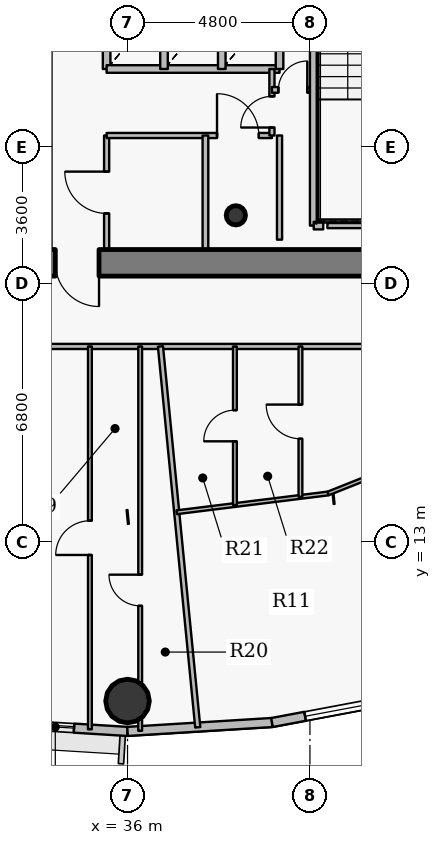
"""IFC4 building model, lengths in metres.
Left out: names, types, materials, properties, quantities, classifications, styles, units other than length and angle.
Written with IfcOpenShell. Run it as: python <this file> out.ifc"""

import sys

from ifc_helpers import new_model, si_unit, direction, frame, frame_2d, origin, origin_2d, place, context, subcontext, project, spatial, rectangle, hollow_circle, extrude, source, transform, mapped, element, fill, save


model = new_model("IFC4")
c1 = context("Model", 3, precision=1e-05, world=origin(), true_north=direction((0.0, 1.0)))
c2 = subcontext(c1, "Body", "Model", "MODEL_VIEW")
j1 = project(units=[si_unit("LENGTHUNIT", "METRE"), si_unit("PLANEANGLEUNIT", "RADIAN")], contexts=[c1])
p1 = place(None, origin())
s1 = spatial("IfcSite", under=j1, at=p1, CompositionType="ELEMENT")
p2 = place(p1, origin())
s2 = spatial("IfcBuilding", under=s1, at=p2, CompositionType="ELEMENT")
p3 = place(p2, frame((0.0, 0.0, 251.55)))
s3 = spatial("IfcBuildingStorey", under=s2, at=p3, CompositionType="ELEMENT", Elevation=251.55)
p4 = place(p3, frame((38.85, 21.6, 0.0), z_axis=(0.0, 0.0, 1.0), x_axis=(1.0, 0.0, 0.0)))
e1 = element("IfcColumn", 1, at=p4, inside=s3, PredefinedType="COLUMN", context=c2, shape_type="SweptSolid", body=[
    extrude(hollow_circle(Radius=0.254, WallThickness=0.02, at=origin_2d()), origin(), (0.0, 0.0, 1.0), 3.75),
])
p5 = place(p3, frame((44.95, 20.35, 0.0), z_axis=(0.0, 0.0, 1.0), x_axis=(-1.0, 0.0, 0.0)))
e2 = element("IfcWall", 2, at=p5, inside=s3, PredefinedType="SHEAR", context=c2, shape_type="SweptSolid", body=[
    extrude(rectangle(XDim=17.9, YDim=0.7, at=frame_2d((8.95, 0.0))), origin(), (0.0, 0.0, 1.0), 3.05),
])
p6 = place(p5, frame((9.7, 0.0, 0.0)))
e3 = element("IfcOpeningElement", 3, at=p6, cuts=e2, PredefinedType="OPENING", context=c2, shape_type="SweptSolid", body=[
    extrude(rectangle(XDim=1.15, YDim=2.15, at=origin_2d()), frame((0.575, 0.36, 1.075), z_axis=(0.0, -1.0, 0.0), x_axis=(1.0, 0.0, 0.0)), (0.0, 0.0, 1.0), 0.72),
])
p7 = place(p3, frame((36.0, 8.82, 0.0), z_axis=(0.0, 0.0, 1.0), x_axis=(1.0, 0.0, 0.0)))
e4 = element("IfcColumn", 4, at=p7, inside=s3, PredefinedType="COLUMN", context=c2, shape_type="SweptSolid", body=[
    extrude(hollow_circle(Radius=0.575, WallThickness=0.036, at=origin_2d()), origin(), (0.0, 0.0, 1.0), 3.75),
])
p8 = place(p3, frame((36.0, 8.02, 0.0), z_axis=(0.0, 0.0, 1.0), x_axis=(-0.998108785312, 0.06147237333, 0.0)))
e5 = element("IfcWall", 5, at=p8, inside=s3, PredefinedType="SOLIDWALL", context=c2, shape_type="SweptSolid", body=[
    extrude(rectangle(XDim=3.809, YDim=0.24, at=frame_2d((1.904, 0.0))), origin(), (0.0, 0.0, 1.0), 3.5),
])
p9 = place(p8, frame((1.41, 0.0, 0.9)))
e6 = element("IfcOpeningElement", 6, at=p9, cuts=e5, PredefinedType="OPENING", context=c2, shape_type="SweptSolid", body=[
    extrude(rectangle(XDim=1.6, YDim=1.75, at=origin_2d()), frame((0.8, 0.13, 0.875), z_axis=(0.0, -1.0, 0.0), x_axis=(1.0, 0.0, 0.0)), (0.0, 0.0, 1.0), 0.26),
])
p10 = place(p3, frame((39.802, 8.254, 0.0), z_axis=(0.0, 0.0, 1.0), x_axis=(-0.998108785312, -0.06147237333, 0.0)))
e7 = element("IfcWall", 7, at=p10, inside=s3, PredefinedType="SOLIDWALL", context=c2, shape_type="SweptSolid", body=[
    extrude(rectangle(XDim=3.809, YDim=0.24, at=frame_2d((1.904, 0.0))), origin(), (0.0, 0.0, 1.0), 3.5),
])
p11 = place(p3, frame((43.509, 8.951, 0.0), z_axis=(0.0, 0.0, 1.0), x_axis=(-0.982784898575, -0.184753465822, 0.0)))
e8 = element("IfcWall", 8, at=p11, inside=s3, PredefinedType="SOLIDWALL", context=c2, shape_type="SweptSolid", body=[
    extrude(rectangle(XDim=3.773, YDim=0.24, at=frame_2d((1.886, 0.0))), origin(), (0.0, 0.0, 1.0), 3.5),
])
p12 = place(p11, frame((0.886, 0.0, 0.9)))
e9 = element("IfcOpeningElement", 9, at=p12, cuts=e8, PredefinedType="OPENING", context=c2, shape_type="SweptSolid", body=[
    extrude(rectangle(XDim=2.0, YDim=1.75, at=origin_2d()), frame((1.0, 0.13, 0.875), z_axis=(0.0, -1.0, 0.0), x_axis=(1.0, 0.0, 0.0)), (0.0, 0.0, 1.0), 0.26),
])
p13 = place(p3, frame((24.35, 18.15, 0.0), z_axis=(0.0, 0.0, 1.0), x_axis=(1.0, 0.0, 0.0)))
e10 = element("IfcWall", 10, at=p13, inside=s3, PredefinedType="PARTITIONING", context=c2, shape_type="SweptSolid", body=[
    extrude(rectangle(XDim=23.85, YDim=0.135, at=frame_2d((11.925, 0.0))), origin(), (0.0, 0.0, 1.0), 2.935),
])
p14 = place(p13, frame((6.069, 0.0, 0.0)))
e11 = element("IfcOpeningElement", 11, at=p14, cuts=e10, PredefinedType="OPENING", context=c2, shape_type="SweptSolid", body=[
    extrude(rectangle(XDim=1.0, YDim=2.15, at=origin_2d()), frame((0.5, 0.078, 1.075), z_axis=(0.0, -1.0, 0.0), x_axis=(1.0, 0.0, 0.0)), (0.0, 0.0, 1.0), 0.155),
])
p15 = place(p13, frame((19.505, 0.0, 0.0)))
e12 = element("IfcOpeningElement", 12, at=p15, cuts=e10, PredefinedType="OPENING", context=c2, shape_type="SweptSolid", body=[
    extrude(rectangle(XDim=1.0, YDim=2.15, at=origin_2d()), frame((0.5, 0.078, 1.075), z_axis=(0.0, -1.0, 0.0), x_axis=(1.0, 0.0, 0.0)), (0.0, 0.0, 1.0), 0.155),
])
p16 = place(p3, frame((35.01, 8.076, 0.0), z_axis=(0.0, 0.0, 1.0), x_axis=(0.0, 1.0, 0.0)))
e13 = element("IfcWall", 13, at=p16, inside=s3, PredefinedType="PARTITIONING", context=c2, shape_type="SweptSolid", body=[
    extrude(rectangle(XDim=10.074, YDim=0.1, at=frame_2d((5.037, 0.0))), origin(), (0.0, 0.0, 1.0), 2.985),
])
p17 = place(p16, frame((4.587, 0.0, 0.0)))
e14 = element("IfcOpeningElement", 14, at=p17, cuts=e13, PredefinedType="OPENING", context=c2, shape_type="SweptSolid", body=[
    extrude(rectangle(XDim=0.9, YDim=2.1, at=origin_2d()), frame((0.45, 0.06, 1.05), z_axis=(0.0, -1.0, 0.0), x_axis=(1.0, 0.0, 0.0)), (0.0, 0.0, 1.0), 0.12),
])
p18 = place(p3, frame((35.45, 20.7, 0.0), z_axis=(0.0, 0.0, 1.0), x_axis=(0.0, 1.0, 0.0)))
e15 = element("IfcWall", 15, at=p18, inside=s3, PredefinedType="PARTITIONING", context=c2, shape_type="SweptSolid", body=[
    extrude(rectangle(XDim=3.0, YDim=0.135, at=frame_2d((1.5, 0.0))), origin(), (0.0, 0.0, 1.0), 3.085),
])
p19 = place(p18, frame((0.95, 0.0, 0.0)))
e16 = element("IfcOpeningElement", 16, at=p19, cuts=e15, PredefinedType="OPENING", context=c2, shape_type="SweptSolid", body=[
    extrude(rectangle(XDim=1.1, YDim=2.15, at=origin_2d()), frame((0.55, 0.078, 1.075), z_axis=(0.0, -1.0, 0.0), x_axis=(1.0, 0.0, 0.0)), (0.0, 0.0, 1.0), 0.155),
])
p20 = place(p3, frame((35.45, 23.7, 0.0), z_axis=(0.0, 0.0, 1.0), x_axis=(1.0, 0.0, 0.0)))
e17 = element("IfcWall", 17, at=p20, inside=s3, PredefinedType="PARTITIONING", context=c2, shape_type="SweptSolid", body=[
    extrude(rectangle(XDim=4.35, YDim=0.135, at=frame_2d((2.175, 0.0))), origin(), (0.0, 0.0, 1.0), 3.085),
])
p21 = place(p20, frame((2.905, 0.0, 0.0)))
e18 = element("IfcOpeningElement", 18, at=p21, cuts=e17, PredefinedType="OPENING", context=c2, shape_type="SweptSolid", body=[
    extrude(rectangle(XDim=1.1, YDim=2.15, at=origin_2d()), frame((0.55, 0.078, 1.075), z_axis=(0.0, -1.0, 0.0), x_axis=(1.0, 0.0, 0.0)), (0.0, 0.0, 1.0), 0.155),
])
p22 = place(p3, frame((35.45, 25.45, 0.0), z_axis=(0.0, 0.0, 1.0), x_axis=(0.0, 1.0, 0.0)))
e19 = element("IfcWall", 19, at=p22, inside=s3, PredefinedType="PARTITIONING", context=c2, shape_type="SweptSolid", body=[
    extrude(rectangle(XDim=1.8, YDim=0.2, at=frame_2d((0.9, 0.0))), origin(), (0.0, 0.0, 1.0), 3.5),
])
p23 = place(p3, frame((35.45, 25.45, 0.0), z_axis=(0.0, 0.0, 1.0), x_axis=(1.0, 0.0, 0.0)))
e20 = element("IfcWall", 20, at=p23, inside=s3, PredefinedType="PARTITIONING", context=c2, shape_type="SweptSolid", body=[
    extrude(rectangle(XDim=4.55, YDim=0.2, at=frame_2d((2.275, 0.0))), origin(), (0.0, 0.0, 1.0), 3.085),
])
p24 = place(p3, frame((36.333, 8.035, 0.0), z_axis=(0.0, 0.0, 1.0), x_axis=(0.0, 1.0, 0.0)))
e21 = element("IfcWall", 21, at=p24, inside=s3, PredefinedType="PARTITIONING", context=c2, shape_type="SweptSolid", body=[
    extrude(rectangle(XDim=10.115, YDim=0.1, at=frame_2d((5.057, 0.0))), origin(), (0.0, 0.0, 1.0), 3.185),
])
p25 = place(p24, frame((3.289, 0.0, 0.0)))
e22 = element("IfcOpeningElement", 22, at=p25, cuts=e21, PredefinedType="OPENING", context=c2, shape_type="SweptSolid", body=[
    extrude(rectangle(XDim=0.82, YDim=2.1, at=origin_2d()), frame((0.41, 0.06, 1.05), z_axis=(0.0, -1.0, 0.0), x_axis=(1.0, 0.0, 0.0)), (0.0, 0.0, 1.0), 0.12),
])
p26 = place(p3, frame((36.867, 18.15, 0.0), z_axis=(0.0, 0.0, 1.0), x_axis=(0.097472533874, -0.995238215273, 0.0)))
e23 = element("IfcWall", 23, at=p26, inside=s3, PredefinedType="PARTITIONING", context=c2, shape_type="SweptSolid", body=[
    extrude(rectangle(XDim=10.069, YDim=0.135, at=frame_2d((5.034, 0.0))), origin(), (0.0, 0.0, 1.0), 2.985),
])
p27 = place(p3, frame((36.96, 25.45, 0.0), z_axis=(0.0, 0.0, 1.0), x_axis=(0.0, 1.0, 0.0)))
e24 = element("IfcWall", 24, at=p27, inside=s3, PredefinedType="PARTITIONING", context=c2, shape_type="SweptSolid", body=[
    extrude(rectangle(XDim=1.8, YDim=0.2, at=frame_2d((0.9, 0.0))), origin(), (0.0, 0.0, 1.0), 3.5),
])
p28 = place(p3, frame((37.294, 13.787, 0.0), z_axis=(0.0, 0.0, 1.0), x_axis=(0.992396239348, 0.123084134349, 0.0)))
e25 = element("IfcWall", 25, at=p28, inside=s3, PredefinedType="PARTITIONING", context=c2, shape_type="SweptSolid", body=[
    extrude(rectangle(XDim=4.015, YDim=0.1, at=frame_2d((2.007, 0.0))), origin(), (0.0, 0.0, 1.0), 2.935),
])
p29 = place(p3, frame((38.05, 20.18, 0.0), z_axis=(0.0, 0.0, 1.0), x_axis=(0.0, 1.0, 0.0)))
e26 = element("IfcWall", 26, at=p29, inside=s3, PredefinedType="PARTITIONING", context=c2, shape_type="SweptSolid", body=[
    extrude(rectangle(XDim=3.52, YDim=0.15, at=frame_2d((1.76, 0.0))), origin(), (0.0, 0.0, 1.0), 3.035),
])
p30 = place(p3, frame((38.48, 25.45, 0.0), z_axis=(0.0, 0.0, 1.0), x_axis=(0.0, 1.0, 0.0)))
e27 = element("IfcWall", 27, at=p30, inside=s3, PredefinedType="PARTITIONING", context=c2, shape_type="SweptSolid", body=[
    extrude(rectangle(XDim=1.8, YDim=0.2, at=frame_2d((0.9, 0.0))), origin(), (0.0, 0.0, 1.0), 3.5),
])
p31 = place(p3, frame((38.826, 13.977, 0.0), z_axis=(0.0, 0.0, 1.0), x_axis=(0.0, 1.0, 0.0)))
e28 = element("IfcWall", 28, at=p31, inside=s3, PredefinedType="PARTITIONING", context=c2, shape_type="SweptSolid", body=[
    extrude(rectangle(XDim=4.173, YDim=0.1, at=frame_2d((2.086, 0.0))), origin(), (0.0, 0.0, 1.0), 3.185),
])
p32 = place(p31, frame((1.677, 0.0, 0.0)))
e29 = element("IfcOpeningElement", 29, at=p32, cuts=e28, PredefinedType="OPENING", context=c2, shape_type="SweptSolid", body=[
    extrude(rectangle(XDim=0.82, YDim=2.1, at=origin_2d()), frame((0.41, 0.06, 1.05), z_axis=(0.0, -1.0, 0.0), x_axis=(1.0, 0.0, 0.0)), (0.0, 0.0, 1.0), 0.12),
])
p33 = place(p3, frame((39.8, 23.7, 0.0), z_axis=(0.0, 0.0, 1.0), x_axis=(0.0, 1.0, 0.0)))
e30 = element("IfcWall", 30, at=p33, inside=s3, PredefinedType="PARTITIONING", context=c2, shape_type="SweptSolid", body=[
    extrude(rectangle(XDim=1.75, YDim=0.135, at=frame_2d((0.875, 0.0))), origin(), (0.0, 0.0, 1.0), 3.5),
])
p34 = place(p33, frame((0.21, 0.0, 0.0)))
e31 = element("IfcOpeningElement", 31, at=p34, cuts=e30, PredefinedType="OPENING", context=c2, shape_type="SweptSolid", body=[
    extrude(rectangle(XDim=0.82, YDim=2.1, at=origin_2d()), frame((0.41, 0.078, 1.05), z_axis=(0.0, -1.0, 0.0), x_axis=(1.0, 0.0, 0.0)), (0.0, 0.0, 1.0), 0.155),
])
p35 = place(p3, frame((39.8, 24.9, 0.0), z_axis=(0.0, 0.0, 1.0), x_axis=(1.0, 0.0, 0.0)))
e32 = element("IfcWall", 32, at=p35, inside=s3, PredefinedType="PARTITIONING", context=c2, shape_type="SweptSolid", body=[
    extrude(rectangle(XDim=1.1, YDim=0.15, at=frame_2d((0.55, 0.0))), origin(), (0.0, 0.0, 1.0), 3.5),
])
p36 = place(p35, frame((0.17, 0.0, 0.0)))
e33 = element("IfcOpeningElement", 33, at=p36, cuts=e32, PredefinedType="OPENING", context=c2, shape_type="SweptSolid", body=[
    extrude(rectangle(XDim=0.76, YDim=2.1, at=origin_2d()), frame((0.38, 0.085, 1.05), z_axis=(0.0, -1.0, 0.0), x_axis=(1.0, 0.0, 0.0)), (0.0, 0.0, 1.0), 0.17),
])
p37 = place(p3, frame((40.0, 25.45, 0.0), z_axis=(0.0, 0.0, 1.0), x_axis=(0.0, 1.0, 0.0)))
e34 = element("IfcWall", 34, at=p37, inside=s3, PredefinedType="PARTITIONING", context=c2, shape_type="SweptSolid", body=[
    extrude(rectangle(XDim=4.4, YDim=0.2, at=frame_2d((2.2, 0.0))), origin(), (0.0, 0.0, 1.0), 3.5),
])
p38 = place(p3, frame((40.55, 14.191, 0.0), z_axis=(0.0, 0.0, 1.0), x_axis=(0.0, 1.0, 0.0)))
e35 = element("IfcWall", 35, at=p38, inside=s3, PredefinedType="PARTITIONING", context=c2, shape_type="SweptSolid", body=[
    extrude(rectangle(XDim=3.959, YDim=0.1, at=frame_2d((1.979, 0.0))), origin(), (0.0, 0.0, 1.0), 2.935),
])
p39 = place(p38, frame((1.53, 0.0, 0.0)))
e36 = element("IfcOpeningElement", 36, at=p39, cuts=e35, PredefinedType="OPENING", context=c2, shape_type="SweptSolid", body=[
    extrude(rectangle(XDim=0.9, YDim=2.1, at=origin_2d()), frame((0.45, 0.06, 1.05), z_axis=(0.0, -1.0, 0.0), x_axis=(1.0, 0.0, 0.0)), (0.0, 0.0, 1.0), 0.12),
])
p40 = place(p3, frame((40.9, 21.33, 0.0), z_axis=(0.0, 0.0, 1.0), x_axis=(0.0, 1.0, 0.0)))
e37 = element("IfcWall", 37, at=p40, inside=s3, PredefinedType="PARTITIONING", context=c2, shape_type="SweptSolid", body=[
    extrude(rectangle(XDim=5.91, YDim=0.2, at=frame_2d((2.955, 0.0))), origin(), (0.0, 0.0, 1.0), 3.035),
])
p41 = place(p3, frame((40.9, 21.33, 0.0), z_axis=(0.0, 0.0, 1.0), x_axis=(1.0, 0.0, 0.0)))
e38 = element("IfcWall", 38, at=p41, inside=s3, PredefinedType="PARTITIONING", context=c2, shape_type="SweptSolid", body=[
    extrude(rectangle(XDim=0.25, YDim=0.2, at=frame_2d((0.125, 0.0))), origin(), (0.0, 0.0, 1.0), 3.035),
])
p42 = place(p3, frame((41.278, 14.281, 0.0), z_axis=(0.0, 0.0, 1.0), x_axis=(0.928799036151, 0.370583796792, 0.0)))
e39 = element("IfcWall", 39, at=p42, inside=s3, PredefinedType="PARTITIONING", context=c2, shape_type="SweptSolid", body=[
    extrude(rectangle(XDim=1.565, YDim=0.1, at=frame_2d((0.783, 0.0))), origin(), (0.0, 0.0, 1.0), 2.935),
])
p43 = place(p3, frame((44.08, 21.33, 0.0), z_axis=(0.0, 0.0, 1.0), x_axis=(-1.0, 0.0, 0.0)))
e40 = element("IfcWall", 40, at=p43, inside=s3, PredefinedType="PARTITIONING", context=c2, shape_type="SweptSolid", body=[
    extrude(rectangle(XDim=2.82, YDim=0.135, at=frame_2d((1.41, 0.0))), origin(), (0.0, 0.0, 1.0), 3.035),
])
p44 = place(p3, frame((40.0, 23.7, 0.0), z_axis=(0.0, 0.0, 1.0), x_axis=(0.0, -1.0, 0.0)))
e41 = element("IfcWall", 41, at=p44, inside=s3, PredefinedType="PARTITIONING", context=c2, shape_type="SweptSolid", body=[
    extrude(rectangle(XDim=2.74, YDim=0.135, at=frame_2d((1.37, 0.0))), origin(), (0.0, 0.0, 1.0), 3.035),
])
m1 = source(origin(), c2, "Body", "SweptSolid", [
    extrude(rectangle(XDim=1.6, YDim=1.75, at=origin_2d()), frame((0.8, 0.03, 0.875), z_axis=(0.0, -1.0, 0.0), x_axis=(1.0, 0.0, 0.0)), (0.0, 0.0, 1.0), 0.06),
])
p45 = place(p9, origin())
e42 = element("IfcWindow", 42, at=p45, inside=s3, PartitioningType="DOUBLE_PANEL_VERTICAL", PredefinedType="WINDOW", context=c2, shape_type="MappedRepresentation", body=[
    mapped(m1, transform((0.0, 0.0, 0.0), x_axis=(1.0, 0.0, 0.0), y_axis=(0.0, 1.0, 0.0), z_axis=(0.0, 0.0, 1.0), scale=1.0)),
])
fill(e6, e42)
m2 = source(origin(), c2, "Body", "SweptSolid", [
    extrude(rectangle(XDim=2.0, YDim=1.75, at=origin_2d()), frame((1.0, 0.03, 0.875), z_axis=(0.0, -1.0, 0.0), x_axis=(1.0, 0.0, 0.0)), (0.0, 0.0, 1.0), 0.06),
])
p46 = place(p12, origin())
e43 = element("IfcWindow", 43, at=p46, inside=s3, PartitioningType="DOUBLE_PANEL_VERTICAL", PredefinedType="WINDOW", context=c2, shape_type="MappedRepresentation", body=[
    mapped(m2, transform((0.0, 0.0, 0.0), x_axis=(1.0, 0.0, 0.0), y_axis=(0.0, 1.0, 0.0), z_axis=(0.0, 0.0, 1.0), scale=1.0)),
])
fill(e9, e43)
m3 = source(origin(), c2, "Body", "SweptSolid", [
    extrude(rectangle(XDim=1.15, YDim=2.15, at=origin_2d()), frame((0.575, 0.025, 1.075), z_axis=(0.0, -1.0, 0.0), x_axis=(1.0, 0.0, 0.0)), (0.0, 0.0, 1.0), 0.05),
])
p47 = place(p6, origin())
e44 = element("IfcDoor", 44, at=p47, inside=s3, OperationType="SINGLE_SWING_LEFT", PredefinedType="DOOR", context=c2, shape_type="MappedRepresentation", body=[
    mapped(m3, transform((0.0, 0.0, 0.0), x_axis=(1.0, 0.0, 0.0), y_axis=(0.0, 1.0, 0.0), z_axis=(0.0, 0.0, 1.0), scale=1.0)),
])
fill(e3, e44)
m4 = source(origin(), c2, "Body", "SweptSolid", [
    extrude(rectangle(XDim=0.9, YDim=2.1, at=origin_2d()), frame((0.45, 0.025, 1.05), z_axis=(0.0, -1.0, 0.0), x_axis=(1.0, 0.0, 0.0)), (0.0, 0.0, 1.0), 0.05),
])
p48 = place(p17, origin())
e45 = element("IfcDoor", 45, at=p48, inside=s3, OperationType="SINGLE_SWING_LEFT", PredefinedType="DOOR", context=c2, shape_type="MappedRepresentation", body=[
    mapped(m4, transform((0.0, 0.0, 0.0), x_axis=(1.0, 0.0, 0.0), y_axis=(0.0, 1.0, 0.0), z_axis=(0.0, 0.0, 1.0), scale=1.0)),
])
fill(e14, e45)
m5 = source(origin(), c2, "Body", "SweptSolid", [
    extrude(rectangle(XDim=0.82, YDim=2.1, at=origin_2d()), frame((0.41, 0.025, 1.05), z_axis=(0.0, -1.0, 0.0), x_axis=(1.0, 0.0, 0.0)), (0.0, 0.0, 1.0), 0.05),
])
p49 = place(p25, origin())
e46 = element("IfcDoor", 46, at=p49, inside=s3, OperationType="SINGLE_SWING_RIGHT", PredefinedType="DOOR", context=c2, shape_type="MappedRepresentation", body=[
    mapped(m5, transform((0.0, 0.0, 0.0), x_axis=(1.0, 0.0, 0.0), y_axis=(0.0, 1.0, 0.0), z_axis=(0.0, 0.0, 1.0), scale=1.0)),
])
fill(e22, e46)
p50 = place(p39, origin())
e47 = element("IfcDoor", 47, at=p50, inside=s3, OperationType="SINGLE_SWING_RIGHT", PredefinedType="DOOR", context=c2, shape_type="MappedRepresentation", body=[
    mapped(m4, transform((0.0, 0.0, 0.0), x_axis=(1.0, 0.0, 0.0), y_axis=(0.0, 1.0, 0.0), z_axis=(0.0, 0.0, 1.0), scale=1.0)),
])
fill(e36, e47)
p51 = place(p32, origin())
e48 = element("IfcDoor", 48, at=p51, inside=s3, OperationType="SINGLE_SWING_LEFT", PredefinedType="DOOR", context=c2, shape_type="MappedRepresentation", body=[
    mapped(m5, transform((0.0, 0.0, 0.0), x_axis=(1.0, 0.0, 0.0), y_axis=(0.0, 1.0, 0.0), z_axis=(0.0, 0.0, 1.0), scale=1.0)),
])
fill(e29, e48)
m6 = source(origin(), c2, "Body", "SweptSolid", [
    extrude(rectangle(XDim=1.1, YDim=2.15, at=origin_2d()), frame((0.55, 0.025, 1.075), z_axis=(0.0, -1.0, 0.0), x_axis=(1.0, 0.0, 0.0)), (0.0, 0.0, 1.0), 0.05),
])
p52 = place(p19, origin())
e49 = element("IfcDoor", 49, at=p52, inside=s3, OperationType="SINGLE_SWING_RIGHT", PredefinedType="DOOR", context=c2, shape_type="MappedRepresentation", body=[
    mapped(m6, transform((0.0, 0.0, 0.0), x_axis=(1.0, 0.0, 0.0), y_axis=(0.0, 1.0, 0.0), z_axis=(0.0, 0.0, 1.0), scale=1.0)),
])
fill(e16, e49)
p53 = place(p21, origin())
e50 = element("IfcDoor", 50, at=p53, inside=s3, OperationType="SINGLE_SWING_LEFT", PredefinedType="DOOR", context=c2, shape_type="MappedRepresentation", body=[
    mapped(m6, transform((0.0, 0.0, 0.0), x_axis=(1.0, 0.0, 0.0), y_axis=(0.0, 1.0, 0.0), z_axis=(0.0, 0.0, 1.0), scale=1.0)),
])
fill(e18, e50)
p54 = place(p34, origin())
e51 = element("IfcDoor", 51, at=p54, inside=s3, OperationType="SINGLE_SWING_LEFT", PredefinedType="DOOR", context=c2, shape_type="MappedRepresentation", body=[
    mapped(m5, transform((0.0, 0.0, 0.0), x_axis=(1.0, 0.0, 0.0), y_axis=(0.0, 1.0, 0.0), z_axis=(0.0, 0.0, 1.0), scale=1.0)),
])
fill(e31, e51)
m7 = source(origin(), c2, "Body", "SweptSolid", [
    extrude(rectangle(XDim=0.76, YDim=2.1, at=origin_2d()), frame((0.38, 0.025, 1.05), z_axis=(0.0, -1.0, 0.0), x_axis=(1.0, 0.0, 0.0)), (0.0, 0.0, 1.0), 0.05),
])
p55 = place(p36, origin())
e52 = element("IfcDoor", 52, at=p55, inside=s3, OperationType="SINGLE_SWING_RIGHT", PredefinedType="DOOR", context=c2, shape_type="MappedRepresentation", body=[
    mapped(m7, transform((0.0, 0.0, 0.0), x_axis=(1.0, 0.0, 0.0), y_axis=(0.0, 1.0, 0.0), z_axis=(0.0, 0.0, 1.0), scale=1.0)),
])
fill(e33, e52)
save(model, sys.argv[1])
